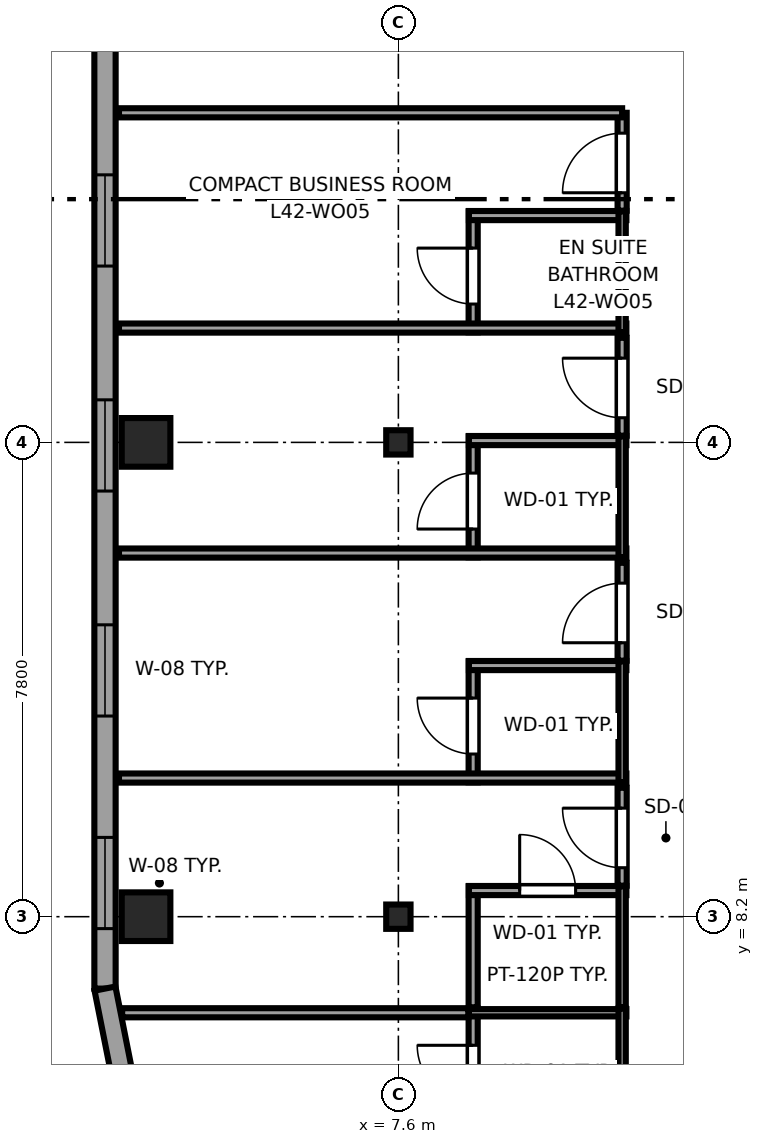
"""IFC4 building model, lengths in metres.
Left out: names, types, materials, properties, quantities, classifications, styles, units other than length and angle.
Written with IfcOpenShell. Run it as: python <this file> out.ifc"""

import sys

from ifc_helpers import new_model, si_unit, direction, frame, frame_2d, origin, origin_2d, place, context, subcontext, project, spatial, rectangle, i_section, extrude, source, transform, mapped, element, fill, save


model = new_model("IFC4")
c1 = context("Model", 3, precision=1e-05, world=origin(), true_north=direction((0.0, 1.0)))
c2 = subcontext(c1, "Body", "Model", "MODEL_VIEW")
j1 = project(units=[si_unit("LENGTHUNIT", "METRE"), si_unit("PLANEANGLEUNIT", "RADIAN")], contexts=[c1])
p1 = place(None, origin())
s1 = spatial("IfcSite", under=j1, at=p1, CompositionType="ELEMENT")
p2 = place(p1, origin())
s2 = spatial("IfcBuilding", under=s1, at=p2, CompositionType="ELEMENT")
p3 = place(p2, frame((0.0, 0.0, 161.25)))
s3 = spatial("IfcBuildingStorey", under=s2, at=p3, CompositionType="ELEMENT", Elevation=161.25)
m1 = source(origin(), c2, "Body", "SweptSolid", [
    extrude(rectangle(XDim=0.8, YDim=0.8, at=origin_2d()), origin(), (0.0, 0.0, 1.0), 3.55),
])
for number, where, z_axis, x_axis in (
    (1, (3.45, 8.2, 0.0), (0.0, 0.0, 1.0), (1.0, 0.0, 0.0)),
    (2, (3.45, 16.0, 0.0), (0.0, 0.0, 1.0), (1.0, 0.0, 0.0)),
):
    element("IfcColumn", number, at=place(p3, frame(where, z_axis=z_axis, x_axis=x_axis)), inside=s3, PredefinedType="COLUMN", context=c2, shape_type="MappedRepresentation", body=[
        mapped(m1, transform((0.0, 0.0, 0.0), x_axis=(1.0, 0.0, 0.0), y_axis=(0.0, 1.0, 0.0), z_axis=(0.0, 0.0, 1.0), scale=1.0)),
    ])
m2 = source(origin(), c2, "Body", "SweptSolid", [
    extrude(i_section(OverallWidth=0.4, OverallDepth=0.4, WebThickness=0.02, FlangeThickness=0.035, at=origin_2d()), origin(), (0.0, 0.0, 1.0), 3.55),
])
for number, where, z_axis, x_axis in (
    (3, (7.6, 8.2, 0.0), (0.0, 0.0, 1.0), (1.0, 0.0, 0.0)),
    (4, (7.6, 16.0, 0.0), (0.0, 0.0, 1.0), (1.0, 0.0, 0.0)),
):
    element("IfcColumn", number, at=place(p3, frame(where, z_axis=z_axis, x_axis=x_axis)), inside=s3, PredefinedType="COLUMN", context=c2, shape_type="MappedRepresentation", body=[
        mapped(m2, transform((0.0, 0.0, 0.0), x_axis=(1.0, 0.0, 0.0), y_axis=(0.0, 1.0, 0.0), z_axis=(0.0, 0.0, 1.0), scale=1.0)),
    ])
p4 = place(p3, frame((2.775, 41.583, 0.0), z_axis=(0.0, 0.0, 1.0), x_axis=(0.0, -1.0, 0.0)))
e5 = element("IfcWall", 5, at=p4, inside=s3, PredefinedType="SOLIDWALL", context=c2, shape_type="SweptSolid", body=[
    extrude(rectangle(XDim=34.566, YDim=0.35, at=frame_2d((17.283, 0.0))), origin(), (0.0, 0.0, 1.0), 3.37),
])
p5 = place(p4, frame((1.41, 0.0, 0.68)))
e6 = element("IfcOpeningElement", 6, at=p5, cuts=e5, PredefinedType="OPENING", context=c2, shape_type="SweptSolid", body=[
    extrude(rectangle(XDim=2.55, YDim=1.92, at=frame_2d((1.275, 0.96))), frame((0.0, 0.185, 0.0), z_axis=(0.0, -1.0, 0.0), x_axis=(1.0, 0.0, 0.0)), (0.0, 0.0, 1.0), 0.37),
])
p6 = place(p4, frame((9.752, 0.0, 0.68)))
e7 = element("IfcOpeningElement", 7, at=p6, cuts=e5, PredefinedType="OPENING", context=c2, shape_type="SweptSolid", body=[
    extrude(rectangle(XDim=2.55, YDim=1.92, at=frame_2d((1.275, 0.96))), frame((0.0, 0.185, 0.0), z_axis=(0.0, -1.0, 0.0), x_axis=(1.0, 0.0, 0.0)), (0.0, 0.0, 1.0), 0.37),
])
p7 = place(p4, frame((32.079, 0.0, 0.62)))
e8 = element("IfcOpeningElement", 8, at=p7, cuts=e5, PredefinedType="OPENING", context=c2, shape_type="SweptSolid", body=[
    extrude(rectangle(XDim=1.5, YDim=1.55, at=frame_2d((0.75, 0.775))), frame((0.0, 0.185, 0.0), z_axis=(0.0, -1.0, 0.0), x_axis=(1.0, 0.0, 0.0)), (0.0, 0.0, 1.0), 0.37),
])
p8 = place(p4, frame((28.583, 0.0, 0.62)))
e9 = element("IfcOpeningElement", 9, at=p8, cuts=e5, PredefinedType="OPENING", context=c2, shape_type="SweptSolid", body=[
    extrude(rectangle(XDim=1.5, YDim=1.55, at=frame_2d((0.75, 0.775))), frame((0.0, 0.185, 0.0), z_axis=(0.0, -1.0, 0.0), x_axis=(1.0, 0.0, 0.0)), (0.0, 0.0, 1.0), 0.37),
])
p9 = place(p4, frame((24.883, 0.0, 0.62)))
e10 = element("IfcOpeningElement", 10, at=p9, cuts=e5, PredefinedType="OPENING", context=c2, shape_type="SweptSolid", body=[
    extrude(rectangle(XDim=1.5, YDim=1.55, at=frame_2d((0.75, 0.775))), frame((0.0, 0.185, 0.0), z_axis=(0.0, -1.0, 0.0), x_axis=(1.0, 0.0, 0.0)), (0.0, 0.0, 1.0), 0.37),
])
p10 = place(p4, frame((21.183, 0.0, 0.62)))
e11 = element("IfcOpeningElement", 11, at=p10, cuts=e5, PredefinedType="OPENING", context=c2, shape_type="SweptSolid", body=[
    extrude(rectangle(XDim=1.5, YDim=1.55, at=frame_2d((0.75, 0.775))), frame((0.0, 0.185, 0.0), z_axis=(0.0, -1.0, 0.0), x_axis=(1.0, 0.0, 0.0)), (0.0, 0.0, 1.0), 0.37),
])
p11 = place(p3, frame((2.775, 7.017, 0.0), z_axis=(0.0, 0.0, 1.0), x_axis=(0.195072403631, -0.980788844421, 0.0)))
e12 = element("IfcWall", 12, at=p11, inside=s3, PredefinedType="SOLIDWALL", context=c2, shape_type="SweptSolid", body=[
    extrude(rectangle(XDim=1.665, YDim=0.35, at=frame_2d((0.832, 0.0))), origin(), (0.0, 0.0, 1.0), 3.37),
])
p12 = place(p3, frame((8.83, 4.7, 0.0), z_axis=(0.0, 0.0, 1.0), x_axis=(0.0, 1.0, 0.0)))
e13 = element("IfcWall", 13, at=p12, inside=s3, PredefinedType="PARTITIONING", context=c2, shape_type="SweptSolid", body=[
    extrude(rectangle(XDim=1.99, YDim=0.15, at=frame_2d((0.995, 0.0))), origin(), (0.0, 0.0, 1.0), 3.37),
])
p13 = place(p12, frame((0.465, 0.0, 0.0)))
e14 = element("IfcOpeningElement", 14, at=p13, cuts=e13, PredefinedType="OPENING", context=c2, shape_type="SweptSolid", body=[
    extrude(rectangle(XDim=0.92, YDim=2.01, at=frame_2d((0.46, 1.005))), frame((0.0, 0.085, 0.0), z_axis=(0.0, -1.0, 0.0), x_axis=(1.0, 0.0, 0.0)), (0.0, 0.0, 1.0), 0.17),
])
p14 = place(p3, frame((8.76, 6.62, 0.0), z_axis=(0.0, 0.0, 1.0), x_axis=(1.0, 0.0, 0.0)))
e15 = element("IfcWall", 15, at=p14, inside=s3, PredefinedType="PLUMBINGWALL", context=c2, shape_type="SweptSolid", body=[
    extrude(rectangle(XDim=2.59, YDim=0.12, at=frame_2d((1.295, 0.0))), origin(), (0.0, 0.0, 1.0), 3.37),
])
p15 = place(p3, frame((11.28, 4.7, 0.0), z_axis=(0.0, 0.0, 1.0), x_axis=(0.0, 1.0, 0.0)))
e16 = element("IfcWall", 16, at=p15, inside=s3, PredefinedType="PLUMBINGWALL", context=c2, shape_type="SweptSolid", body=[
    extrude(rectangle(XDim=1.99, YDim=0.12, at=frame_2d((0.995, 0.0))), origin(), (0.0, 0.0, 1.0), 3.37),
])
p16 = place(p3, frame((8.83, 6.71, 0.0), z_axis=(0.0, 0.0, 1.0), x_axis=(0.0, 1.0, 0.0)))
e17 = element("IfcWall", 17, at=p16, inside=s3, PredefinedType="PARTITIONING", context=c2, shape_type="SweptSolid", body=[
    extrude(rectangle(XDim=1.99, YDim=0.15, at=frame_2d((0.995, 0.0))), origin(), (0.0, 0.0, 1.0), 3.37),
])
p17 = place(p3, frame((8.76, 8.63, 0.0), z_axis=(0.0, 0.0, 1.0), x_axis=(1.0, 0.0, 0.0)))
e18 = element("IfcWall", 18, at=p17, inside=s3, PredefinedType="PARTITIONING", context=c2, shape_type="SweptSolid", body=[
    extrude(rectangle(XDim=2.59, YDim=0.15, at=frame_2d((1.295, 0.0))), origin(), (0.0, 0.0, 1.0), 3.37),
])
p18 = place(p17, frame((0.835, 0.0, 0.0)))
e19 = element("IfcOpeningElement", 19, at=p18, cuts=e18, PredefinedType="OPENING", context=c2, shape_type="SweptSolid", body=[
    extrude(rectangle(XDim=0.92, YDim=2.01, at=frame_2d((0.46, 1.005))), frame((0.0, 0.085, 0.0), z_axis=(0.0, -1.0, 0.0), x_axis=(1.0, 0.0, 0.0)), (0.0, 0.0, 1.0), 0.17),
])
p19 = place(p3, frame((11.28, 6.71, 0.0), z_axis=(0.0, 0.0, 1.0), x_axis=(0.0, 1.0, 0.0)))
e20 = element("IfcWall", 20, at=p19, inside=s3, PredefinedType="PLUMBINGWALL", context=c2, shape_type="SweptSolid", body=[
    extrude(rectangle(XDim=1.99, YDim=0.12, at=frame_2d((0.995, 0.0))), origin(), (0.0, 0.0, 1.0), 3.001),
])
p20 = place(p3, frame((8.83, 10.41, 0.0), z_axis=(0.0, 0.0, 1.0), x_axis=(0.0, 1.0, 0.0)))
e21 = element("IfcWall", 21, at=p20, inside=s3, PredefinedType="PARTITIONING", context=c2, shape_type="SweptSolid", body=[
    extrude(rectangle(XDim=1.99, YDim=0.15, at=frame_2d((0.995, 0.0))), origin(), (0.0, 0.0, 1.0), 3.37),
])
p21 = place(p20, frame((0.465, 0.0, 0.0)))
e22 = element("IfcOpeningElement", 22, at=p21, cuts=e21, PredefinedType="OPENING", context=c2, shape_type="SweptSolid", body=[
    extrude(rectangle(XDim=0.92, YDim=2.01, at=frame_2d((0.46, 1.005))), frame((0.0, 0.085, 0.0), z_axis=(0.0, -1.0, 0.0), x_axis=(1.0, 0.0, 0.0)), (0.0, 0.0, 1.0), 0.17),
])
p22 = place(p3, frame((3.005, 10.48, 0.0), z_axis=(0.0, 0.0, 1.0), x_axis=(1.0, 0.0, 0.0)))
e23 = element("IfcWall", 23, at=p22, inside=s3, PredefinedType="PARTITIONING", context=c2, shape_type="SweptSolid", body=[
    extrude(rectangle(XDim=8.345, YDim=0.15, at=frame_2d((4.173, 0.0))), origin(), (0.0, 0.0, 1.0), 3.37),
])
p23 = place(p3, frame((8.76, 12.33, 0.0), z_axis=(0.0, 0.0, 1.0), x_axis=(1.0, 0.0, 0.0)))
e24 = element("IfcWall", 24, at=p23, inside=s3, PredefinedType="PARTITIONING", context=c2, shape_type="SweptSolid", body=[
    extrude(rectangle(XDim=2.59, YDim=0.15, at=frame_2d((1.295, 0.0))), origin(), (0.0, 0.0, 1.0), 3.37),
])
p24 = place(p3, frame((11.28, 10.41, 0.0), z_axis=(0.0, 0.0, 1.0), x_axis=(0.0, 1.0, 0.0)))
e25 = element("IfcWall", 25, at=p24, inside=s3, PredefinedType="PLUMBINGWALL", context=c2, shape_type="SweptSolid", body=[
    extrude(rectangle(XDim=1.99, YDim=0.12, at=frame_2d((0.995, 0.0))), origin(), (0.0, 0.0, 1.0), 3.001),
])
p25 = place(p3, frame((8.83, 14.11, 0.0), z_axis=(0.0, 0.0, 1.0), x_axis=(0.0, 1.0, 0.0)))
e26 = element("IfcWall", 26, at=p25, inside=s3, PredefinedType="PARTITIONING", context=c2, shape_type="SweptSolid", body=[
    extrude(rectangle(XDim=1.99, YDim=0.15, at=frame_2d((0.995, 0.0))), origin(), (0.0, 0.0, 1.0), 3.37),
])
p26 = place(p25, frame((0.465, 0.0, 0.0)))
e27 = element("IfcOpeningElement", 27, at=p26, cuts=e26, PredefinedType="OPENING", context=c2, shape_type="SweptSolid", body=[
    extrude(rectangle(XDim=0.92, YDim=2.01, at=frame_2d((0.46, 1.005))), frame((0.0, 0.085, 0.0), z_axis=(0.0, -1.0, 0.0), x_axis=(1.0, 0.0, 0.0)), (0.0, 0.0, 1.0), 0.17),
])
p27 = place(p3, frame((3.005, 14.18, 0.0), z_axis=(0.0, 0.0, 1.0), x_axis=(1.0, 0.0, 0.0)))
e28 = element("IfcWall", 28, at=p27, inside=s3, PredefinedType="PARTITIONING", context=c2, shape_type="SweptSolid", body=[
    extrude(rectangle(XDim=8.345, YDim=0.15, at=frame_2d((4.173, 0.0))), origin(), (0.0, 0.0, 1.0), 3.37),
])
p28 = place(p3, frame((8.76, 16.03, 0.0), z_axis=(0.0, 0.0, 1.0), x_axis=(1.0, 0.0, 0.0)))
e29 = element("IfcWall", 29, at=p28, inside=s3, PredefinedType="PARTITIONING", context=c2, shape_type="SweptSolid", body=[
    extrude(rectangle(XDim=2.59, YDim=0.15, at=frame_2d((1.295, 0.0))), origin(), (0.0, 0.0, 1.0), 2.758),
])
p29 = place(p3, frame((11.28, 14.11, 0.0), z_axis=(0.0, 0.0, 1.0), x_axis=(0.0, 1.0, 0.0)))
e30 = element("IfcWall", 30, at=p29, inside=s3, PredefinedType="PLUMBINGWALL", context=c2, shape_type="SweptSolid", body=[
    extrude(rectangle(XDim=1.99, YDim=0.12, at=frame_2d((0.995, 0.0))), origin(), (0.0, 0.0, 1.0), 3.001),
])
p30 = place(p3, frame((8.83, 17.81, 0.0), z_axis=(0.0, 0.0, 1.0), x_axis=(0.0, 1.0, 0.0)))
e31 = element("IfcWall", 31, at=p30, inside=s3, PredefinedType="PARTITIONING", context=c2, shape_type="SweptSolid", body=[
    extrude(rectangle(XDim=1.99, YDim=0.15, at=frame_2d((0.995, 0.0))), origin(), (0.0, 0.0, 1.0), 3.37),
])
p31 = place(p30, frame((0.465, 0.0, 0.0)))
e32 = element("IfcOpeningElement", 32, at=p31, cuts=e31, PredefinedType="OPENING", context=c2, shape_type="SweptSolid", body=[
    extrude(rectangle(XDim=0.92, YDim=2.01, at=frame_2d((0.46, 1.005))), frame((0.0, 0.085, 0.0), z_axis=(0.0, -1.0, 0.0), x_axis=(1.0, 0.0, 0.0)), (0.0, 0.0, 1.0), 0.17),
])
p32 = place(p3, frame((3.005, 17.88, 0.0), z_axis=(0.0, 0.0, 1.0), x_axis=(1.0, 0.0, 0.0)))
e33 = element("IfcWall", 33, at=p32, inside=s3, PredefinedType="PARTITIONING", context=c2, shape_type="SweptSolid", body=[
    extrude(rectangle(XDim=8.345, YDim=0.15, at=frame_2d((4.173, 0.0))), origin(), (0.0, 0.0, 1.0), 3.37),
])
p33 = place(p3, frame((8.76, 19.73, 0.0), z_axis=(0.0, 0.0, 1.0), x_axis=(1.0, 0.0, 0.0)))
e34 = element("IfcWall", 34, at=p33, inside=s3, PredefinedType="PARTITIONING", context=c2, shape_type="SweptSolid", body=[
    extrude(rectangle(XDim=2.59, YDim=0.15, at=frame_2d((1.295, 0.0))), origin(), (0.0, 0.0, 1.0), 3.37),
])
p34 = place(p3, frame((11.28, 17.81, 0.0), z_axis=(0.0, 0.0, 1.0), x_axis=(0.0, 1.0, 0.0)))
e35 = element("IfcWall", 35, at=p34, inside=s3, PredefinedType="PLUMBINGWALL", context=c2, shape_type="SweptSolid", body=[
    extrude(rectangle(XDim=1.99, YDim=0.12, at=frame_2d((0.995, 0.0))), origin(), (0.0, 0.0, 1.0), 3.001),
])
p35 = place(p3, frame((3.057, 6.62, 0.0), z_axis=(0.0, 0.0, 1.0), x_axis=(1.0, 0.0, 0.0)))
e36 = element("IfcWall", 36, at=p35, inside=s3, PredefinedType="PARTITIONING", context=c2, shape_type="SweptSolid", body=[
    extrude(rectangle(XDim=5.693, YDim=0.15, at=frame_2d((2.847, 0.0))), origin(), (0.0, 0.0, 1.0), 3.37),
])
p36 = place(p3, frame((11.28, 8.71, 0.0), z_axis=(0.0, 0.0, 1.0), x_axis=(0.0, 1.0, 0.0)))
e37 = element("IfcWall", 37, at=p36, inside=s3, PredefinedType="PARTITIONING", context=c2, shape_type="SweptSolid", body=[
    extrude(rectangle(XDim=1.61, YDim=0.15, at=frame_2d((0.805, 0.0))), origin(), (0.0, 0.0, 1.0), 3.001),
])
p37 = place(p36, frame((0.295, 0.0, 0.0)))
e38 = element("IfcOpeningElement", 38, at=p37, cuts=e37, PredefinedType="OPENING", context=c2, shape_type="SweptSolid", body=[
    extrude(rectangle(XDim=0.98, YDim=2.12, at=frame_2d((0.49, 1.06))), frame((0.0, 0.085, 0.0), z_axis=(0.0, -1.0, 0.0), x_axis=(1.0, 0.0, 0.0)), (0.0, 0.0, 1.0), 0.17),
])
p38 = place(p3, frame((11.28, 12.41, 0.0), z_axis=(0.0, 0.0, 1.0), x_axis=(0.0, 1.0, 0.0)))
e39 = element("IfcWall", 39, at=p38, inside=s3, PredefinedType="PARTITIONING", context=c2, shape_type="SweptSolid", body=[
    extrude(rectangle(XDim=1.61, YDim=0.15, at=frame_2d((0.805, 0.0))), origin(), (0.0, 0.0, 1.0), 3.001),
])
p39 = place(p38, frame((0.295, 0.0, 0.0)))
e40 = element("IfcOpeningElement", 40, at=p39, cuts=e39, PredefinedType="OPENING", context=c2, shape_type="SweptSolid", body=[
    extrude(rectangle(XDim=0.98, YDim=2.12, at=frame_2d((0.49, 1.06))), frame((0.0, 0.085, 0.0), z_axis=(0.0, -1.0, 0.0), x_axis=(1.0, 0.0, 0.0)), (0.0, 0.0, 1.0), 0.17),
])
p40 = place(p3, frame((11.28, 16.11, 0.0), z_axis=(0.0, 0.0, 1.0), x_axis=(0.0, 1.0, 0.0)))
e41 = element("IfcWall", 41, at=p40, inside=s3, PredefinedType="PARTITIONING", context=c2, shape_type="SweptSolid", body=[
    extrude(rectangle(XDim=1.61, YDim=0.15, at=frame_2d((0.805, 0.0))), origin(), (0.0, 0.0, 1.0), 3.001),
])
p41 = place(p40, frame((0.295, 0.0, 0.0)))
e42 = element("IfcOpeningElement", 42, at=p41, cuts=e41, PredefinedType="OPENING", context=c2, shape_type="SweptSolid", body=[
    extrude(rectangle(XDim=0.98, YDim=2.12, at=frame_2d((0.49, 1.06))), frame((0.0, 0.085, 0.0), z_axis=(0.0, -1.0, 0.0), x_axis=(1.0, 0.0, 0.0)), (0.0, 0.0, 1.0), 0.17),
])
p42 = place(p3, frame((11.28, 19.81, 0.0), z_axis=(0.0, 0.0, 1.0), x_axis=(0.0, 1.0, 0.0)))
e43 = element("IfcWall", 43, at=p42, inside=s3, PredefinedType="PARTITIONING", context=c2, shape_type="SweptSolid", body=[
    extrude(rectangle(XDim=1.61, YDim=0.15, at=frame_2d((0.805, 0.0))), origin(), (0.0, 0.0, 1.0), 3.001),
])
p43 = place(p42, frame((0.295, 0.0, 0.0)))
e44 = element("IfcOpeningElement", 44, at=p43, cuts=e43, PredefinedType="OPENING", context=c2, shape_type="SweptSolid", body=[
    extrude(rectangle(XDim=0.98, YDim=2.12, at=frame_2d((0.49, 1.06))), frame((0.0, 0.085, 0.0), z_axis=(0.0, -1.0, 0.0), x_axis=(1.0, 0.0, 0.0)), (0.0, 0.0, 1.0), 0.17),
])
p44 = place(p3, frame((3.005, 21.42, 0.0), z_axis=(0.0, 0.0, 1.0), x_axis=(1.0, 0.0, 0.0)))
e45 = element("IfcWall", 45, at=p44, inside=s3, PredefinedType="PARTITIONING", context=c2, shape_type="SweptSolid", body=[
    extrude(rectangle(XDim=8.275, YDim=0.15, at=frame_2d((4.138, 0.0))), origin(), (0.0, 0.0, 1.0), 3.37),
])
m3 = source(origin(), c2, "Body", "SweptSolid", [
    extrude(rectangle(XDim=1.5, YDim=1.55, at=frame_2d((0.75, 0.775))), frame((0.0, 0.09, 0.0), z_axis=(0.0, -1.0, 0.0), x_axis=(1.0, 0.0, 0.0)), (0.0, 0.0, 1.0), 0.06),
])
p45 = place(p7, origin())
e46 = element("IfcWindow", 46, at=p45, inside=s3, PartitioningType="SINGLE_PANEL", PredefinedType="WINDOW", context=c2, shape_type="MappedRepresentation", body=[
    mapped(m3, transform((0.0, 0.0, 0.0), x_axis=(1.0, 0.0, 0.0), y_axis=(0.0, 1.0, 0.0), z_axis=(0.0, 0.0, 1.0), scale=1.0)),
])
fill(e8, e46)
p46 = place(p8, origin())
e47 = element("IfcWindow", 47, at=p46, inside=s3, PartitioningType="SINGLE_PANEL", PredefinedType="WINDOW", context=c2, shape_type="MappedRepresentation", body=[
    mapped(m3, transform((0.0, 0.0, 0.0), x_axis=(1.0, 0.0, 0.0), y_axis=(0.0, 1.0, 0.0), z_axis=(0.0, 0.0, 1.0), scale=1.0)),
])
fill(e9, e47)
p47 = place(p9, origin())
e48 = element("IfcWindow", 48, at=p47, inside=s3, PartitioningType="SINGLE_PANEL", PredefinedType="WINDOW", context=c2, shape_type="MappedRepresentation", body=[
    mapped(m3, transform((0.0, 0.0, 0.0), x_axis=(1.0, 0.0, 0.0), y_axis=(0.0, 1.0, 0.0), z_axis=(0.0, 0.0, 1.0), scale=1.0)),
])
fill(e10, e48)
p48 = place(p10, origin())
e49 = element("IfcWindow", 49, at=p48, inside=s3, PartitioningType="SINGLE_PANEL", PredefinedType="WINDOW", context=c2, shape_type="MappedRepresentation", body=[
    mapped(m3, transform((0.0, 0.0, 0.0), x_axis=(1.0, 0.0, 0.0), y_axis=(0.0, 1.0, 0.0), z_axis=(0.0, 0.0, 1.0), scale=1.0)),
])
fill(e11, e49)
m4 = source(origin(), c2, "Body", "SweptSolid", [
    extrude(rectangle(XDim=0.92, YDim=2.01, at=frame_2d((0.46, 1.005))), frame((0.0, 0.025, 0.0), z_axis=(0.0, -1.0, 0.0), x_axis=(1.0, 0.0, 0.0)), (0.0, 0.0, 1.0), 0.05),
])
p49 = place(p13, origin())
e50 = element("IfcDoor", 50, at=p49, inside=s3, OperationType="SINGLE_SWING_RIGHT", PredefinedType="DOOR", context=c2, shape_type="MappedRepresentation", body=[
    mapped(m4, transform((0.0, 0.0, 0.0), x_axis=(1.0, 0.0, 0.0), y_axis=(0.0, 1.0, 0.0), z_axis=(0.0, 0.0, 1.0), scale=1.0)),
])
fill(e14, e50)
p50 = place(p18, origin())
e51 = element("IfcDoor", 51, at=p50, inside=s3, OperationType="SINGLE_SWING_LEFT", PredefinedType="DOOR", context=c2, shape_type="MappedRepresentation", body=[
    mapped(m4, transform((0.0, 0.0, 0.0), x_axis=(1.0, 0.0, 0.0), y_axis=(0.0, 1.0, 0.0), z_axis=(0.0, 0.0, 1.0), scale=1.0)),
])
fill(e19, e51)
p51 = place(p21, origin())
e52 = element("IfcDoor", 52, at=p51, inside=s3, OperationType="SINGLE_SWING_RIGHT", PredefinedType="DOOR", context=c2, shape_type="MappedRepresentation", body=[
    mapped(m4, transform((0.0, 0.0, 0.0), x_axis=(1.0, 0.0, 0.0), y_axis=(0.0, 1.0, 0.0), z_axis=(0.0, 0.0, 1.0), scale=1.0)),
])
fill(e22, e52)
p52 = place(p26, origin())
e53 = element("IfcDoor", 53, at=p52, inside=s3, OperationType="SINGLE_SWING_LEFT", PredefinedType="DOOR", context=c2, shape_type="MappedRepresentation", body=[
    mapped(m4, transform((0.0, 0.0, 0.0), x_axis=(1.0, 0.0, 0.0), y_axis=(0.0, 1.0, 0.0), z_axis=(0.0, 0.0, 1.0), scale=1.0)),
])
fill(e27, e53)
p53 = place(p31, origin())
e54 = element("IfcDoor", 54, at=p53, inside=s3, OperationType="SINGLE_SWING_RIGHT", PredefinedType="DOOR", context=c2, shape_type="MappedRepresentation", body=[
    mapped(m4, transform((0.0, 0.0, 0.0), x_axis=(1.0, 0.0, 0.0), y_axis=(0.0, 1.0, 0.0), z_axis=(0.0, 0.0, 1.0), scale=1.0)),
])
fill(e32, e54)
m5 = source(origin(), c2, "Body", "SweptSolid", [
    extrude(rectangle(XDim=0.98, YDim=2.12, at=frame_2d((0.49, 1.06))), frame((0.0, 0.025, 0.0), z_axis=(0.0, -1.0, 0.0), x_axis=(1.0, 0.0, 0.0)), (0.0, 0.0, 1.0), 0.05),
])
p54 = place(p37, origin())
e55 = element("IfcDoor", 55, at=p54, inside=s3, OperationType="SINGLE_SWING_RIGHT", PredefinedType="DOOR", context=c2, shape_type="MappedRepresentation", body=[
    mapped(m5, transform((0.0, 0.0, 0.0), x_axis=(1.0, 0.0, 0.0), y_axis=(0.0, 1.0, 0.0), z_axis=(0.0, 0.0, 1.0), scale=1.0)),
])
fill(e38, e55)
p55 = place(p39, origin())
e56 = element("IfcDoor", 56, at=p55, inside=s3, OperationType="SINGLE_SWING_LEFT", PredefinedType="DOOR", context=c2, shape_type="MappedRepresentation", body=[
    mapped(m5, transform((0.0, 0.0, 0.0), x_axis=(1.0, 0.0, 0.0), y_axis=(0.0, 1.0, 0.0), z_axis=(0.0, 0.0, 1.0), scale=1.0)),
])
fill(e40, e56)
p56 = place(p41, origin())
e57 = element("IfcDoor", 57, at=p56, inside=s3, OperationType="SINGLE_SWING_RIGHT", PredefinedType="DOOR", context=c2, shape_type="MappedRepresentation", body=[
    mapped(m5, transform((0.0, 0.0, 0.0), x_axis=(1.0, 0.0, 0.0), y_axis=(0.0, 1.0, 0.0), z_axis=(0.0, 0.0, 1.0), scale=1.0)),
])
fill(e42, e57)
p57 = place(p43, origin())
e58 = element("IfcDoor", 58, at=p57, inside=s3, OperationType="SINGLE_SWING_LEFT", PredefinedType="DOOR", context=c2, shape_type="MappedRepresentation", body=[
    mapped(m5, transform((0.0, 0.0, 0.0), x_axis=(1.0, 0.0, 0.0), y_axis=(0.0, 1.0, 0.0), z_axis=(0.0, 0.0, 1.0), scale=1.0)),
])
fill(e44, e58)
save(model, sys.argv[1])
